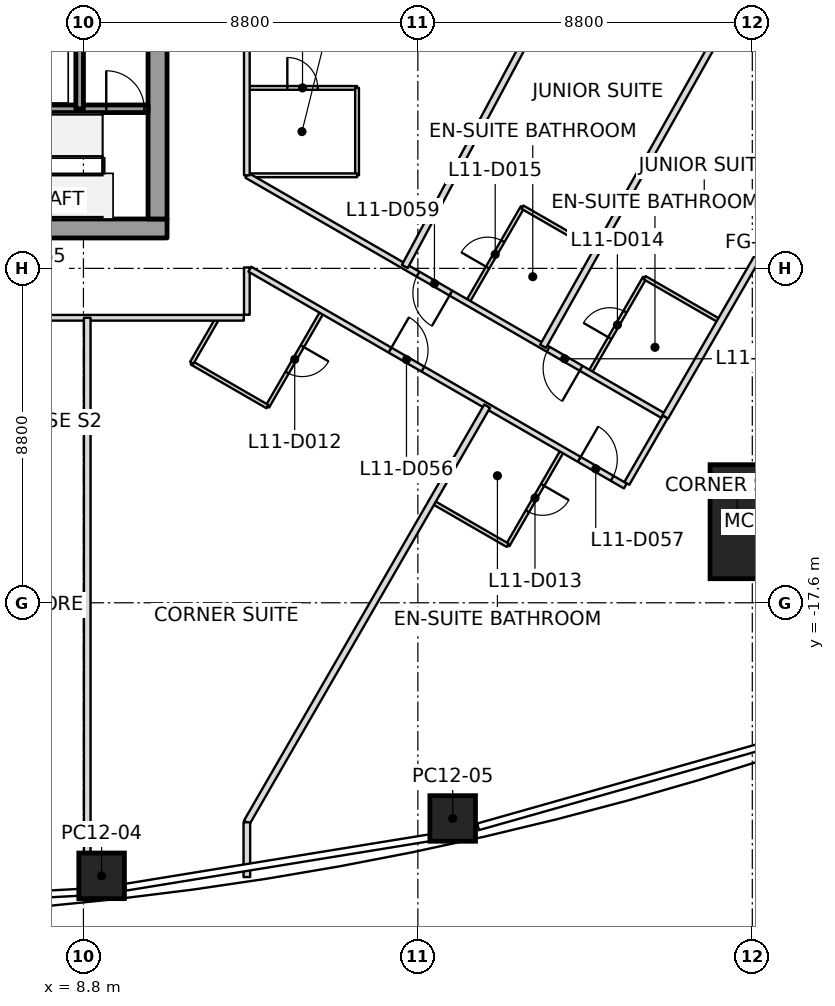
"""IFC4 building model, lengths in metres.
Left out: names, types, materials, properties, quantities, classifications, styles, units other than length and angle.
Written with IfcOpenShell. Run it as: python <this file> out.ifc"""

import sys

from ifc_helpers import new_model, si_unit, direction, frame, frame_2d, origin, origin_2d, place, context, subcontext, project, spatial, rectangle, extrude, clip, halfspace, element, fill, save


model = new_model("IFC4")
c1 = context("Model", 3, precision=1e-05, world=origin(), true_north=direction((0.0, 1.0)))
c2 = subcontext(c1, "Body", "Model", "MODEL_VIEW")
j1 = project(units=[si_unit("LENGTHUNIT", "METRE"), si_unit("PLANEANGLEUNIT", "RADIAN")], contexts=[c1])
p1 = place(None, origin())
s1 = spatial("IfcSite", under=j1, at=p1, CompositionType="ELEMENT")
p2 = place(p1, origin())
s2 = spatial("IfcBuilding", under=s1, at=p2, CompositionType="ELEMENT")
p3 = place(p2, frame((0.0, 0.0, 62.8)))
s3 = spatial("IfcBuildingStorey", under=s2, at=p3, CompositionType="ELEMENT", Elevation=62.8)
p4 = place(p3, frame((26.789, -15.467, 0.0), z_axis=(-0.030531992032, 0.017607001884, 0.999378702468), x_axis=(0.999533790055, 0.000537827582, 0.03052725469)))
e1 = element("IfcColumn", 1, at=p4, inside=s3, PredefinedType="COLUMN", context=c2, shape_type="SweptSolid", body=[
    extrude(rectangle(XDim=3.0, YDim=3.0, at=origin_2d()), origin(), (0.0, 0.0, 1.0), 3.702),
])
p5 = place(p3, frame((9.278, -24.785, 0.0), z_axis=(-0.009454937322, 0.223059337629, 0.97475901435), x_axis=(-0.988869315433, -0.146836694661, 0.024009625055)))
e2 = element("IfcColumn", 2, at=p5, inside=s3, PredefinedType="COLUMN", context=c2, shape_type="SweptSolid", body=[
    clip(extrude(rectangle(XDim=1.2, YDim=1.2, at=origin_2d()), origin(), (0.0, 0.0, 1.0), 3.796), halfspace(frame((0.0, 0.0, 3.789)), False)),
])
p6 = place(p3, frame((18.516, -23.275, 0.0), z_axis=(-0.019035359056, 0.17391691533, 0.98457633613), x_axis=(0.976521539024, 0.214578146302, -0.019023747061)))
e3 = element("IfcColumn", 3, at=p6, inside=s3, PredefinedType="COLUMN", context=c2, shape_type="SweptSolid", body=[
    clip(clip(extrude(rectangle(XDim=1.2, YDim=1.2, at=origin_2d()), origin(), (0.0, 0.0, 1.0), 3.758), halfspace(frame((0.0, 0.0, 0.0)), True)), halfspace(frame((0.0, 0.0, 3.752)), False)),
])
p7 = place(p3, frame((-11.0, -7.75, 0.0), z_axis=(0.0, 0.0, 1.0), x_axis=(1.0, 0.0, 0.0)))
e4 = element("IfcWall", 4, at=p7, inside=s3, PredefinedType="SHEAR", context=c2, shape_type="SweptSolid", body=[
    extrude(rectangle(XDim=22.0, YDim=0.5, at=frame_2d((11.0, 0.0))), origin(), (0.0, 0.0, 1.0), 3.7),
])
p8 = place(p7, frame((10.45, 0.0, 0.0)))
e5 = element("IfcOpeningElement", 5, at=p8, cuts=e4, PredefinedType="OPENING", context=c2, shape_type="SweptSolid", body=[
    extrude(rectangle(XDim=1.1, YDim=2.1, at=frame_2d((0.55, 1.05))), frame((0.0, 0.25, 0.0), z_axis=(0.0, -1.0, 0.0), x_axis=(1.0, 0.0, 0.0)), (0.0, 0.0, 1.0), 0.5),
])
p9 = place(p3, frame((10.75, -7.5, 0.0), z_axis=(0.0, 0.0, 1.0), x_axis=(0.0, 1.0, 0.0)))
e6 = element("IfcWall", 6, at=p9, inside=s3, PredefinedType="SHEAR", context=c2, shape_type="SweptSolid", body=[
    extrude(rectangle(XDim=15.0, YDim=0.5, at=frame_2d((7.5, 0.0))), origin(), (0.0, 0.0, 1.0), 3.7),
])
p10 = place(p9, frame((6.6, 0.0, 0.0)))
e7 = element("IfcOpeningElement", 7, at=p10, cuts=e6, PredefinedType="OPENING", context=c2, shape_type="SweptSolid", body=[
    extrude(rectangle(XDim=1.8, YDim=2.1, at=frame_2d((0.9, 1.05))), frame((0.0, 0.25, 0.0), z_axis=(0.0, -1.0, 0.0), x_axis=(1.0, 0.0, 0.0)), (0.0, 0.0, 1.0), 0.5),
])
p11 = place(p3, frame((6.1, -4.6, 0.0), z_axis=(0.0, 0.0, 1.0), x_axis=(1.0, 0.0, 0.0)))
e8 = element("IfcWall", 8, at=p11, inside=s3, PredefinedType="SOLIDWALL", context=c2, shape_type="SweptSolid", body=[
    extrude(rectangle(XDim=2.6, YDim=0.2, at=frame_2d((1.3, 0.0))), origin(), (0.0, 0.0, 1.0), 3.55),
])
p12 = place(p3, frame((8.7, -4.6, 0.0), z_axis=(0.0, 0.0, 1.0), x_axis=(1.0, 0.0, 0.0)))
e9 = element("IfcWall", 9, at=p12, inside=s3, PredefinedType="SOLIDWALL", context=c2, shape_type="SweptSolid", body=[
    extrude(rectangle(XDim=1.8, YDim=0.2, at=frame_2d((0.9, 0.0))), origin(), (0.0, 0.0, 1.0), 3.55),
])
p13 = place(p12, frame((0.7, 0.0, 0.0)))
e10 = element("IfcOpeningElement", 10, at=p13, cuts=e9, PredefinedType="OPENING", context=c2, shape_type="SweptSolid", body=[
    extrude(rectangle(XDim=1.0, YDim=2.1, at=frame_2d((0.5, 1.05))), frame((0.0, 0.1, 0.0), z_axis=(0.0, -1.0, 0.0), x_axis=(1.0, 0.0, 0.0)), (0.0, 0.0, 1.0), 0.2),
])
p14 = place(p3, frame((8.7, -1.8, 0.0), z_axis=(0.0, 0.0, 1.0), x_axis=(0.0, -1.0, 0.0)))
e11 = element("IfcWall", 11, at=p14, inside=s3, PredefinedType="SOLIDWALL", context=c2, shape_type="SweptSolid", body=[
    extrude(rectangle(XDim=2.8, YDim=0.2, at=frame_2d((1.4, 0.0))), origin(), (0.0, 0.0, 1.0), 3.55),
])
p15 = place(p3, frame((8.9, -25.353, 0.0), z_axis=(0.0, 0.0, 1.0), x_axis=(0.0, 1.0, 0.0)))
e12 = element("IfcWall", 12, at=p15, inside=s3, PredefinedType="PARTITIONING", context=c2, shape_type="SweptSolid", body=[
    extrude(rectangle(XDim=15.253, YDim=0.175, at=frame_2d((7.626, 0.0))), origin(), (0.0, 0.0, 1.0), 3.15),
])
p16 = place(p3, frame((19.422, -12.426, 0.0), z_axis=(0.0, 0.0, 1.0), x_axis=(-0.499984848557, -0.866034151298, 0.0)))
e13 = element("IfcWall", 13, at=p16, inside=s3, PredefinedType="PARTITIONING", context=c2, shape_type="SweptSolid", body=[
    extrude(rectangle(XDim=12.645, YDim=0.175, at=frame_2d((6.323, 0.0))), origin(), (0.0, 0.0, 1.0), 2.934),
])
p17 = place(p3, frame((13.1, -23.377, 0.0), z_axis=(0.0, 0.0, 1.0), x_axis=(0.0, -1.0, 0.0)))
e14 = element("IfcWall", 14, at=p17, inside=s3, PredefinedType="PARTITIONING", context=c2, shape_type="SweptSolid", body=[
    extrude(rectangle(XDim=1.44, YDim=0.175, at=frame_2d((0.72, 0.0))), origin(), (0.0, 0.0, 1.0), 2.934),
])
p18 = place(p3, frame((17.257, -8.751, 0.0), z_axis=(0.0, 0.0, 1.0), x_axis=(0.471767248767, 0.881723121502, 0.0)))
e15 = element("IfcWall", 15, at=p18, inside=s3, PredefinedType="PARTITIONING", context=c2, shape_type="SweptSolid", body=[
    extrude(rectangle(XDim=14.203, YDim=0.175, at=frame_2d((7.102, 0.0))), origin(), (0.0, 0.0, 1.0), 2.947),
])
p19 = place(p3, frame((20.894, -10.851, 0.0), z_axis=(0.0, 0.0, 1.0), x_axis=(0.489970665473, 0.871738921338, 0.0)))
e16 = element("IfcWall", 16, at=p19, inside=s3, PredefinedType="PARTITIONING", context=c2, shape_type="SweptSolid", body=[
    extrude(rectangle(XDim=11.011, YDim=0.175, at=frame_2d((5.505, 0.0))), origin(), (0.0, 0.0, 1.0), 2.934),
])
p20 = place(p3, frame((24.11, -12.707, 0.0), z_axis=(0.0, 0.0, 1.0), x_axis=(0.500004040168, 0.86602307118, 0.0)))
e17 = element("IfcWall", 17, at=p20, inside=s3, PredefinedType="PARTITIONING", context=c2, shape_type="SweptSolid", body=[
    extrude(rectangle(XDim=8.506, YDim=0.175, at=frame_2d((4.253, 0.0))), origin(), (0.0, 0.0, 1.0), 2.934),
])
p21 = place(p3, frame((-13.02, -10.1, 0.0), z_axis=(0.0, 0.0, 1.0), x_axis=(1.0, 0.0, 0.0)))
e18 = element("IfcWall", 18, at=p21, inside=s3, PredefinedType="PARTITIONING", context=c2, shape_type="SweptSolid", body=[
    extrude(rectangle(XDim=26.04, YDim=0.15, at=frame_2d((13.02, 0.0))), origin(), (0.0, 0.0, 1.0), 2.947),
])
p22 = place(p21, frame((4.02, 0.0, 0.0)))
e19 = element("IfcOpeningElement", 19, at=p22, cuts=e18, PredefinedType="OPENING", context=c2, shape_type="SweptSolid", body=[
    extrude(rectangle(XDim=1.0, YDim=2.1, at=frame_2d((0.5, 1.05))), frame((0.0, 0.075, 0.0), z_axis=(0.0, -1.0, 0.0), x_axis=(1.0, 0.0, 0.0)), (0.0, 0.0, 1.0), 0.15),
])
p23 = place(p21, frame((7.02, 0.0, 0.0)))
e20 = element("IfcOpeningElement", 20, at=p23, cuts=e18, PredefinedType="OPENING", context=c2, shape_type="SweptSolid", body=[
    extrude(rectangle(XDim=1.0, YDim=2.1, at=frame_2d((0.5, 1.05))), frame((0.0, 0.075, 0.0), z_axis=(0.0, -1.0, 0.0), x_axis=(1.0, 0.0, 0.0)), (0.0, 0.0, 1.0), 0.15),
])
p24 = place(p21, frame((12.12, 0.0, 0.0)))
e21 = element("IfcOpeningElement", 21, at=p24, cuts=e18, PredefinedType="OPENING", context=c2, shape_type="SweptSolid", body=[
    extrude(rectangle(XDim=1.0, YDim=2.1, at=frame_2d((0.5, 1.05))), frame((0.0, 0.075, 0.0), z_axis=(0.0, -1.0, 0.0), x_axis=(1.0, 0.0, 0.0)), (0.0, 0.0, 1.0), 0.15),
])
p25 = place(p21, frame((16.62, 0.0, 0.0)))
e22 = element("IfcOpeningElement", 22, at=p25, cuts=e18, PredefinedType="OPENING", context=c2, shape_type="SweptSolid", body=[
    extrude(rectangle(XDim=1.0, YDim=2.1, at=frame_2d((0.5, 1.05))), frame((0.0, 0.075, 0.0), z_axis=(0.0, -1.0, 0.0), x_axis=(1.0, 0.0, 0.0)), (0.0, 0.0, 1.0), 0.15),
])
p26 = place(p21, frame((19.62, 0.0, 0.0)))
e23 = element("IfcOpeningElement", 23, at=p26, cuts=e18, PredefinedType="OPENING", context=c2, shape_type="SweptSolid", body=[
    extrude(rectangle(XDim=1.0, YDim=2.1, at=frame_2d((0.5, 1.05))), frame((0.0, 0.075, 0.0), z_axis=(0.0, -1.0, 0.0), x_axis=(1.0, 0.0, 0.0)), (0.0, 0.0, 1.0), 0.15),
])
p27 = place(p3, frame((13.1, -10.02, 0.0), z_axis=(0.0, 0.0, 1.0), x_axis=(0.0, 1.0, 0.0)))
e24 = element("IfcWall", 24, at=p27, inside=s3, PredefinedType="PARTITIONING", context=c2, shape_type="SweptSolid", body=[
    extrude(rectangle(XDim=1.244, YDim=0.15, at=frame_2d((0.622, 0.0))), origin(), (0.0, 0.0, 1.0), 2.797),
])
p28 = place(p3, frame((13.179, -8.822, 0.0), z_axis=(0.0, 0.0, 1.0), x_axis=(0.86603413911, -0.499984869667, 0.0)))
e25 = element("IfcWall", 25, at=p28, inside=s3, PredefinedType="PARTITIONING", context=c2, shape_type="SweptSolid", body=[
    extrude(rectangle(XDim=11.409, YDim=0.15, at=frame_2d((5.705, 0.0))), origin(), (0.0, 0.0, 1.0), 2.797),
])
p29 = place(p28, frame((4.259, 0.0, 0.0)))
e26 = element("IfcOpeningElement", 26, at=p29, cuts=e25, PredefinedType="OPENING", context=c2, shape_type="SweptSolid", body=[
    extrude(rectangle(XDim=1.0, YDim=2.1, at=frame_2d((0.5, 1.05))), frame((0.0, 0.075, 0.0), z_axis=(0.0, -1.0, 0.0), x_axis=(1.0, 0.0, 0.0)), (0.0, 0.0, 1.0), 0.15),
])
p30 = place(p28, frame((10.009, 0.0, 0.0)))
e27 = element("IfcOpeningElement", 27, at=p30, cuts=e25, PredefinedType="OPENING", context=c2, shape_type="SweptSolid", body=[
    extrude(rectangle(XDim=1.0, YDim=2.1, at=frame_2d((0.5, 1.05))), frame((0.0, 0.075, 0.0), z_axis=(0.0, -1.0, 0.0), x_axis=(1.0, 0.0, 0.0)), (0.0, 0.0, 1.0), 0.15),
])
p31 = place(p3, frame((23.1, -14.457, 0.0), z_axis=(0.0, 0.0, 1.0), x_axis=(0.500025864173, 0.866010470582, 0.0)))
e28 = element("IfcWall", 28, at=p31, inside=s3, PredefinedType="PARTITIONING", context=c2, shape_type="SweptSolid", body=[
    extrude(rectangle(XDim=2.02, YDim=0.15, at=frame_2d((1.01, 0.0))), origin(), (0.0, 0.0, 1.0), 2.797),
])
p32 = place(p3, frame((24.04, -12.667, 0.0), z_axis=(0.0, 0.0, 1.0), x_axis=(-0.866022415501, 0.500005175824, 0.0)))
e29 = element("IfcWall", 29, at=p32, inside=s3, PredefinedType="PARTITIONING", context=c2, shape_type="SweptSolid", body=[
    extrude(rectangle(XDim=12.633, YDim=0.15, at=frame_2d((6.316, 0.0))), origin(), (0.0, 0.0, 1.0), 2.947),
])
p33 = place(p32, frame((2.477, 0.0, 0.0)))
e30 = element("IfcOpeningElement", 30, at=p33, cuts=e29, PredefinedType="OPENING", context=c2, shape_type="SweptSolid", body=[
    extrude(rectangle(XDim=1.0, YDim=2.1, at=frame_2d((0.5, 1.05))), frame((0.0, 0.075, 0.0), z_axis=(0.0, -1.0, 0.0), x_axis=(1.0, 0.0, 0.0)), (0.0, 0.0, 1.0), 0.15),
])
p34 = place(p32, frame((6.433, 0.0, 0.0)))
e31 = element("IfcOpeningElement", 31, at=p34, cuts=e29, PredefinedType="OPENING", context=c2, shape_type="SweptSolid", body=[
    extrude(rectangle(XDim=1.0, YDim=2.1, at=frame_2d((0.5, 1.05))), frame((0.0, 0.075, 0.0), z_axis=(0.0, -1.0, 0.0), x_axis=(1.0, 0.0, 0.0)), (0.0, 0.0, 1.0), 0.15),
])
p35 = place(p3, frame((13.1, -6.351, 0.0), z_axis=(0.0, 0.0, 1.0), x_axis=(0.0, 1.0, 0.0)))
e32 = element("IfcWall", 32, at=p35, inside=s3, PredefinedType="PARTITIONING", context=c2, shape_type="SweptSolid", body=[
    extrude(rectangle(XDim=16.371, YDim=0.15, at=frame_2d((8.186, 0.0))), origin(), (0.0, 0.0, 1.0), 3.017),
])
p36 = place(p35, frame((14.751, 0.0, 0.0)))
e33 = element("IfcOpeningElement", 33, at=p36, cuts=e32, PredefinedType="OPENING", context=c2, shape_type="SweptSolid", body=[
    extrude(rectangle(XDim=1.0, YDim=2.1, at=frame_2d((0.5, 1.05))), frame((0.0, 0.075, 0.0), z_axis=(0.0, -1.0, 0.0), x_axis=(1.0, 0.0, 0.0)), (0.0, 0.0, 1.0), 0.15),
])
p37 = place(p35, frame((6.525, 0.0, 0.0)))
e34 = element("IfcOpeningElement", 34, at=p37, cuts=e32, PredefinedType="OPENING", context=c2, shape_type="SweptSolid", body=[
    extrude(rectangle(XDim=1.0, YDim=2.1, at=frame_2d((0.5, 1.05))), frame((0.0, 0.075, 0.0), z_axis=(0.0, -1.0, 0.0), x_axis=(1.0, 0.0, 0.0)), (0.0, 0.0, 1.0), 0.15),
])
p38 = place(p3, frame((15.077, -9.952, 0.0), z_axis=(0.0, 0.0, 1.0), x_axis=(-0.499999802827, -0.866025517622, 0.0)))
e35 = element("IfcWall", 35, at=p38, inside=s3, PredefinedType="PARTITIONING", context=c2, shape_type="SweptSolid", body=[
    extrude(rectangle(XDim=2.87, YDim=0.1, at=frame_2d((1.435, 0.0))), origin(), (0.0, 0.0, 1.0), 2.797),
])
p39 = place(p38, frame((1.035, 0.0, 0.0)))
e36 = element("IfcOpeningElement", 36, at=p39, cuts=e35, PredefinedType="OPENING", context=c2, shape_type="SweptSolid", body=[
    extrude(rectangle(XDim=0.8, YDim=2.1, at=frame_2d((0.4, 1.05))), frame((0.0, 0.05, 0.0), z_axis=(0.0, -1.0, 0.0), x_axis=(1.0, 0.0, 0.0)), (0.0, 0.0, 1.0), 0.1),
])
p40 = place(p3, frame((13.642, -12.437, 0.0), z_axis=(0.0, 0.0, 1.0), x_axis=(-0.866007057882, 0.500031774688, 0.0)))
e37 = element("IfcWall", 37, at=p40, inside=s3, PredefinedType="PARTITIONING", context=c2, shape_type="SweptSolid", body=[
    extrude(rectangle(XDim=2.3, YDim=0.1, at=frame_2d((1.15, 0.0))), origin(), (0.0, 0.0, 1.0), 2.947),
])
p41 = place(p3, frame((11.65, -11.287, 0.0), z_axis=(0.0, 0.0, 1.0), x_axis=(0.500049290317, 0.865996944136, 0.0)))
e38 = element("IfcWall", 38, at=p41, inside=s3, PredefinedType="PARTITIONING", context=c2, shape_type="SweptSolid", body=[
    extrude(rectangle(XDim=1.336, YDim=0.1, at=frame_2d((0.668, 0.0))), origin(), (0.0, 0.0, 1.0), 3.15),
])
p42 = place(p3, frame((13.13, -4.051, 0.0), z_axis=(0.0, 0.0, 1.0), x_axis=(1.0, 0.0, 0.0)))
e39 = element("IfcWall", 39, at=p42, inside=s3, PredefinedType="PARTITIONING", context=c2, shape_type="SweptSolid", body=[
    extrude(rectangle(XDim=2.87, YDim=0.1, at=frame_2d((1.435, 0.0))), origin(), (0.0, 0.0, 1.0), 3.15),
])
p43 = place(p42, frame((1.035, 0.0, 0.0)))
e40 = element("IfcOpeningElement", 40, at=p43, cuts=e39, PredefinedType="OPENING", context=c2, shape_type="SweptSolid", body=[
    extrude(rectangle(XDim=0.8, YDim=2.1, at=frame_2d((0.4, 1.05))), frame((0.0, 0.05, 0.0), z_axis=(0.0, -1.0, 0.0), x_axis=(1.0, 0.0, 0.0)), (0.0, 0.0, 1.0), 0.1),
])
p44 = place(p3, frame((16.0, -4.051, 0.0), z_axis=(0.0, 0.0, 1.0), x_axis=(0.0, -1.0, 0.0)))
e41 = element("IfcWall", 41, at=p44, inside=s3, PredefinedType="PARTITIONING", context=c2, shape_type="SweptSolid", body=[
    extrude(rectangle(XDim=2.3, YDim=0.1, at=frame_2d((1.15, 0.0))), origin(), (0.0, 0.0, 1.0), 2.947),
])
p45 = place(p3, frame((16.0, -6.351, 0.0), z_axis=(0.0, 0.0, 1.0), x_axis=(-1.0, 0.0, 0.0)))
e42 = element("IfcWall", 42, at=p45, inside=s3, PredefinedType="PARTITIONING", context=c2, shape_type="SweptSolid", body=[
    extrude(rectangle(XDim=2.84, YDim=0.1, at=frame_2d((1.42, 0.0))), origin(), (0.0, 0.0, 1.0), 2.947),
])
p46 = place(p3, frame((21.399, -13.602, 0.0), z_axis=(0.0, 0.0, 1.0), x_axis=(-0.499999802827, -0.866025517622, 0.0)))
e43 = element("IfcWall", 43, at=p46, inside=s3, PredefinedType="PARTITIONING", context=c2, shape_type="SweptSolid", body=[
    extrude(rectangle(XDim=2.87, YDim=0.1, at=frame_2d((1.435, 0.0))), origin(), (0.0, 0.0, 1.0), 3.15),
])
p47 = place(p46, frame((1.035, 0.0, 0.0)))
e44 = element("IfcOpeningElement", 44, at=p47, cuts=e43, PredefinedType="OPENING", context=c2, shape_type="SweptSolid", body=[
    extrude(rectangle(XDim=0.8, YDim=2.1, at=frame_2d((0.4, 1.05))), frame((0.0, 0.05, 0.0), z_axis=(0.0, -1.0, 0.0), x_axis=(1.0, 0.0, 0.0)), (0.0, 0.0, 1.0), 0.1),
])
p48 = place(p3, frame((19.964, -16.087, 0.0), z_axis=(0.0, 0.0, 1.0), x_axis=(-0.866017224141, 0.500014167291, 0.0)))
e45 = element("IfcWall", 45, at=p48, inside=s3, PredefinedType="PARTITIONING", context=c2, shape_type="SweptSolid", body=[
    extrude(rectangle(XDim=2.27, YDim=0.1, at=frame_2d((1.135, 0.0))), origin(), (0.0, 0.0, 1.0), 3.15),
])
p49 = place(p3, frame((18.917, -9.675, 0.0), z_axis=(0.0, 0.0, 1.0), x_axis=(0.499972835562, 0.866041086612, 0.0)))
e46 = element("IfcWall", 46, at=p49, inside=s3, PredefinedType="PARTITIONING", context=c2, shape_type="SweptSolid", body=[
    extrude(rectangle(XDim=2.87, YDim=0.1, at=frame_2d((1.435, 0.0))), origin(), (0.0, 0.0, 1.0), 3.15),
])
p50 = place(p49, frame((1.035, 0.0, 0.0)))
e47 = element("IfcOpeningElement", 47, at=p50, cuts=e46, PredefinedType="OPENING", context=c2, shape_type="SweptSolid", body=[
    extrude(rectangle(XDim=0.8, YDim=2.1, at=frame_2d((0.4, 1.05))), frame((0.0, 0.05, 0.0), z_axis=(0.0, -1.0, 0.0), x_axis=(1.0, 0.0, 0.0)), (0.0, 0.0, 1.0), 0.1),
])
p51 = place(p3, frame((20.352, -7.189, 0.0), z_axis=(0.0, 0.0, 1.0), x_axis=(0.866017224141, -0.500014167291, 0.0)))
e48 = element("IfcWall", 48, at=p51, inside=s3, PredefinedType="PARTITIONING", context=c2, shape_type="SweptSolid", body=[
    extrude(rectangle(XDim=2.27, YDim=0.1, at=frame_2d((1.135, 0.0))), origin(), (0.0, 0.0, 1.0), 3.15),
])
p52 = place(p3, frame((22.133, -11.531, 0.0), z_axis=(0.0, 0.0, 1.0), x_axis=(0.500036638401, 0.866004249561, 0.0)))
e49 = element("IfcWall", 49, at=p52, inside=s3, PredefinedType="PARTITIONING", context=c2, shape_type="SweptSolid", body=[
    extrude(rectangle(XDim=2.87, YDim=0.1, at=frame_2d((1.435, 0.0))), origin(), (0.0, 0.0, 1.0), 3.15),
])
p53 = place(p52, frame((1.035, 0.0, 0.0)))
e50 = element("IfcOpeningElement", 50, at=p53, cuts=e49, PredefinedType="OPENING", context=c2, shape_type="SweptSolid", body=[
    extrude(rectangle(XDim=0.8, YDim=2.1, at=frame_2d((0.4, 1.05))), frame((0.0, 0.05, 0.0), z_axis=(0.0, -1.0, 0.0), x_axis=(1.0, 0.0, 0.0)), (0.0, 0.0, 1.0), 0.1),
])
p54 = place(p3, frame((23.568, -9.046, 0.0), z_axis=(0.0, 0.0, 1.0), x_axis=(0.866017224141, -0.500014167291, 0.0)))
e51 = element("IfcWall", 51, at=p54, inside=s3, PredefinedType="PARTITIONING", context=c2, shape_type="SweptSolid", body=[
    extrude(rectangle(XDim=2.27, YDim=0.1, at=frame_2d((1.135, 0.0))), origin(), (0.0, 0.0, 1.0), 3.15),
])
p55 = place(p29, origin())
e52 = element("IfcDoor", 52, at=p55, inside=s3, OperationType="SINGLE_SWING_LEFT", PredefinedType="DOOR", context=c2, shape_type="SweptSolid", body=[
    extrude(rectangle(XDim=1.0, YDim=2.1, at=frame_2d((0.5, 1.05))), frame((0.0, 0.025, 0.0), z_axis=(0.0, -1.0, 0.0), x_axis=(1.0, 0.0, 0.0)), (0.0, 0.0, 1.0), 0.05),
])
fill(e26, e52)
p56 = place(p39, origin())
e53 = element("IfcDoor", 53, at=p56, inside=s3, OperationType="SINGLE_SWING_RIGHT", PredefinedType="DOOR", context=c2, shape_type="SweptSolid", body=[
    extrude(rectangle(XDim=0.8, YDim=2.1, at=frame_2d((0.4, 1.05))), frame((0.0, 0.025, 0.0), z_axis=(0.0, -1.0, 0.0), x_axis=(1.0, 0.0, 0.0)), (0.0, 0.0, 1.0), 0.05),
])
fill(e36, e53)
p57 = place(p30, origin())
e54 = element("IfcDoor", 54, at=p57, inside=s3, OperationType="SINGLE_SWING_RIGHT", PredefinedType="DOOR", context=c2, shape_type="SweptSolid", body=[
    extrude(rectangle(XDim=1.0, YDim=2.1, at=frame_2d((0.5, 1.05))), frame((0.0, 0.025, 0.0), z_axis=(0.0, -1.0, 0.0), x_axis=(1.0, 0.0, 0.0)), (0.0, 0.0, 1.0), 0.05),
])
fill(e27, e54)
p58 = place(p47, origin())
e55 = element("IfcDoor", 55, at=p58, inside=s3, OperationType="SINGLE_SWING_RIGHT", PredefinedType="DOOR", context=c2, shape_type="SweptSolid", body=[
    extrude(rectangle(XDim=0.8, YDim=2.1, at=frame_2d((0.4, 1.05))), frame((0.0, 0.025, 0.0), z_axis=(0.0, -1.0, 0.0), x_axis=(1.0, 0.0, 0.0)), (0.0, 0.0, 1.0), 0.05),
])
fill(e44, e55)
p59 = place(p33, origin())
e56 = element("IfcDoor", 56, at=p59, inside=s3, OperationType="SINGLE_SWING_LEFT", PredefinedType="DOOR", context=c2, shape_type="SweptSolid", body=[
    extrude(rectangle(XDim=1.0, YDim=2.1, at=frame_2d((0.5, 1.05))), frame((0.0, 0.025, 0.0), z_axis=(0.0, -1.0, 0.0), x_axis=(1.0, 0.0, 0.0)), (0.0, 0.0, 1.0), 0.05),
])
fill(e30, e56)
p60 = place(p53, origin())
e57 = element("IfcDoor", 57, at=p60, inside=s3, OperationType="SINGLE_SWING_RIGHT", PredefinedType="DOOR", context=c2, shape_type="SweptSolid", body=[
    extrude(rectangle(XDim=0.8, YDim=2.1, at=frame_2d((0.4, 1.05))), frame((0.0, 0.025, 0.0), z_axis=(0.0, -1.0, 0.0), x_axis=(1.0, 0.0, 0.0)), (0.0, 0.0, 1.0), 0.05),
])
fill(e50, e57)
p61 = place(p34, origin())
e58 = element("IfcDoor", 58, at=p61, inside=s3, OperationType="SINGLE_SWING_LEFT", PredefinedType="DOOR", context=c2, shape_type="SweptSolid", body=[
    extrude(rectangle(XDim=1.0, YDim=2.1, at=frame_2d((0.5, 1.05))), frame((0.0, 0.025, 0.0), z_axis=(0.0, -1.0, 0.0), x_axis=(1.0, 0.0, 0.0)), (0.0, 0.0, 1.0), 0.05),
])
fill(e31, e58)
p62 = place(p50, origin())
e59 = element("IfcDoor", 59, at=p62, inside=s3, OperationType="SINGLE_SWING_LEFT", PredefinedType="DOOR", context=c2, shape_type="SweptSolid", body=[
    extrude(rectangle(XDim=0.8, YDim=2.1, at=frame_2d((0.4, 1.05))), frame((0.0, 0.025, 0.0), z_axis=(0.0, -1.0, 0.0), x_axis=(1.0, 0.0, 0.0)), (0.0, 0.0, 1.0), 0.05),
])
fill(e47, e59)
p63 = place(p43, origin())
e60 = element("IfcDoor", 60, at=p63, inside=s3, OperationType="SINGLE_SWING_LEFT", PredefinedType="DOOR", context=c2, shape_type="SweptSolid", body=[
    extrude(rectangle(XDim=0.8, YDim=2.1, at=frame_2d((0.4, 1.05))), frame((0.0, 0.025, 0.0), z_axis=(0.0, -1.0, 0.0), x_axis=(1.0, 0.0, 0.0)), (0.0, 0.0, 1.0), 0.05),
])
fill(e40, e60)
p64 = place(p13, origin())
e61 = element("IfcDoor", 61, at=p64, inside=s3, OperationType="SINGLE_SWING_RIGHT", PredefinedType="DOOR", context=c2, shape_type="SweptSolid", body=[
    extrude(rectangle(XDim=1.0, YDim=2.1, at=frame_2d((0.5, 1.05))), frame((0.0, 0.025, 0.0), z_axis=(0.0, -1.0, 0.0), x_axis=(1.0, 0.0, 0.0)), (0.0, 0.0, 1.0), 0.05),
])
fill(e10, e61)
save(model, sys.argv[1])
